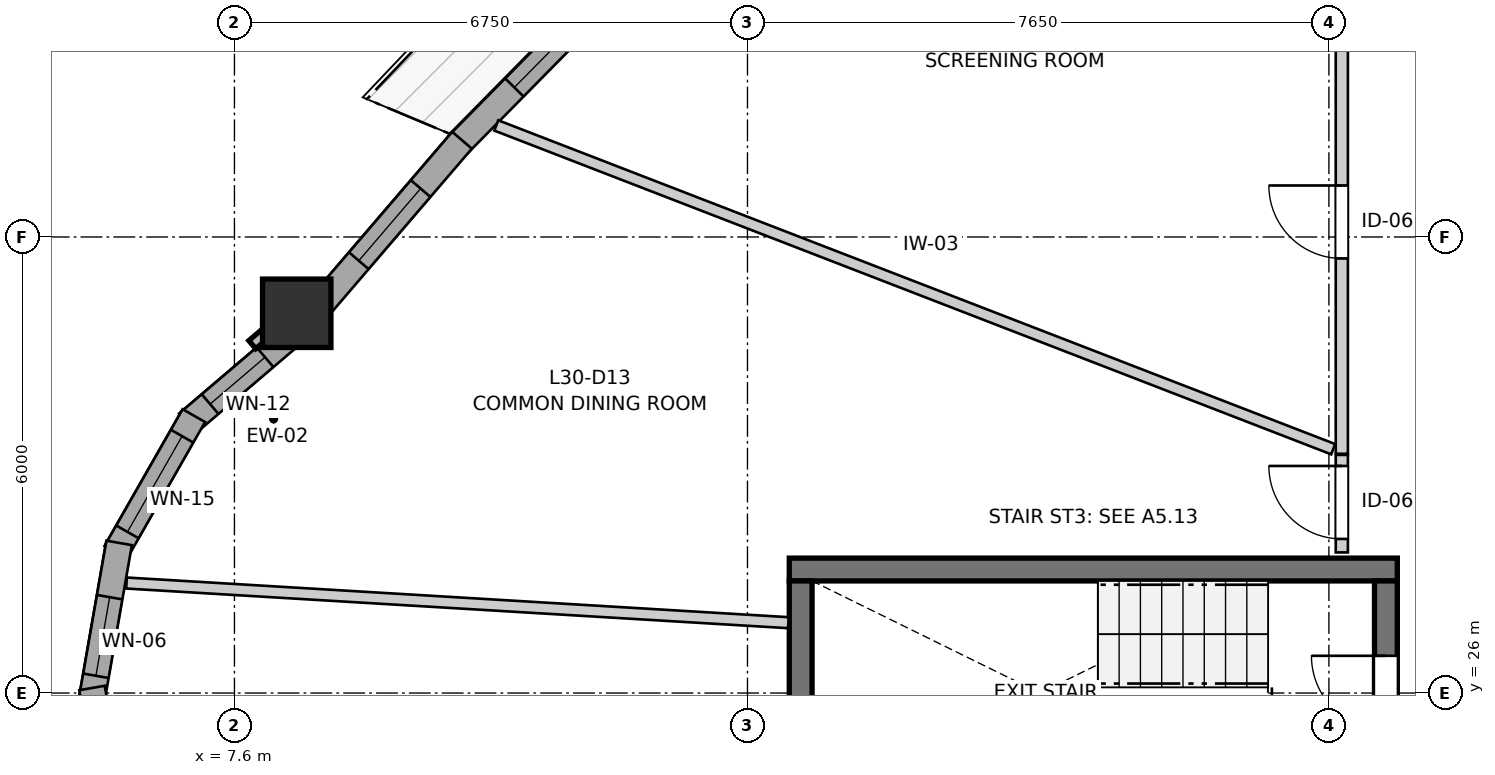
"""IFC4 building model, lengths in metres.
Left out: names, types, materials, properties, quantities, classifications, styles, units other than length and angle.
Written with IfcOpenShell. Run it as: python <this file> out.ifc"""

import sys

from ifc_helpers import new_model, si_unit, direction, frame, frame_2d, origin, origin_2d, place, context, subcontext, project, spatial, rectangle, extrude, source, transform, mapped, element, fill, save


model = new_model("IFC4")
c1 = context("Model", 3, precision=1e-05, world=origin(), true_north=direction((0.0, 1.0)))
c2 = subcontext(c1, "Body", "Model", "MODEL_VIEW")
j1 = project(units=[si_unit("LENGTHUNIT", "METRE"), si_unit("PLANEANGLEUNIT", "RADIAN")], contexts=[c1])
p1 = place(None, origin())
s1 = spatial("IfcSite", under=j1, at=p1, CompositionType="ELEMENT")
p2 = place(p1, origin())
s2 = spatial("IfcBuilding", under=s1, at=p2, CompositionType="ELEMENT")
p3 = place(p2, frame((0.0, 0.0, 102.4)))
s3 = spatial("IfcBuildingStorey", under=s2, at=p3, CompositionType="ELEMENT", Elevation=102.4)
p4 = place(p3, frame((22.9, 27.625, 0.0), z_axis=(0.0, 0.0, 1.0), x_axis=(-1.0, 0.0, 0.0)))
e1 = element("IfcWall", 1, at=p4, inside=s3, PredefinedType="SHEAR", context=c2, shape_type="SweptSolid", body=[
    extrude(rectangle(XDim=8.0, YDim=0.3, at=frame_2d((4.0, 0.0))), origin(), (0.0, 0.0, 1.0), 2.95),
])
p5 = place(p3, frame((15.05, 27.475, 0.0), z_axis=(0.0, 0.0, 1.0), x_axis=(0.0, -1.0, 0.0)))
e2 = element("IfcWall", 2, at=p5, inside=s3, PredefinedType="SHEAR", context=c2, shape_type="SweptSolid", body=[
    extrude(rectangle(XDim=2.95, YDim=0.3, at=frame_2d((1.475, 0.0))), origin(), (0.0, 0.0, 1.0), 2.95),
])
p6 = place(p3, frame((22.75, 24.525, 0.0), z_axis=(0.0, 0.0, 1.0), x_axis=(0.0, 1.0, 0.0)))
e3 = element("IfcWall", 3, at=p6, inside=s3, PredefinedType="SHEAR", context=c2, shape_type="SweptSolid", body=[
    extrude(rectangle(XDim=2.95, YDim=0.3, at=frame_2d((1.475, 0.0))), origin(), (0.0, 0.0, 1.0), 2.95),
])
p7 = place(p6, frame((0.985, 0.0, 0.0)))
e4 = element("IfcOpeningElement", 4, at=p7, cuts=e3, PredefinedType="OPENING", context=c2, shape_type="SweptSolid", body=[
    extrude(rectangle(XDim=0.98, YDim=2.15, at=frame_2d((0.49, 1.075))), frame((0.0, 0.16, 0.0), z_axis=(0.0, -1.0, 0.0), x_axis=(1.0, 0.0, 0.0)), (0.0, 0.0, 1.0), 0.32),
])
m1 = source(origin(), c2, "Body", "SweptSolid", [
    extrude(rectangle(XDim=0.9, YDim=0.9, at=origin_2d()), origin(), (0.0, 0.0, 1.0), 2.95),
])
p8 = place(p3, frame((8.419, 30.996, 0.0), z_axis=(0.0, 0.0, 1.0), x_axis=(1.0, 0.0, 0.0)))
e5 = element("IfcColumn", 5, at=p8, inside=s3, PredefinedType="COLUMN", context=c2, shape_type="MappedRepresentation", body=[
    mapped(m1, transform((0.0, 0.0, 0.0), x_axis=(1.0, 0.0, 0.0), y_axis=(0.0, 1.0, 0.0), z_axis=(0.0, 0.0, 1.0), scale=1.0)),
])
p9 = place(p3, frame((8.355, 30.718, 0.0), z_axis=(0.0, 0.0, 1.0), x_axis=(-0.761134405886, -0.648594184507, 0.0)))
e6 = element("IfcWall", 6, at=p9, inside=s3, PredefinedType="SOLIDWALL", context=c2, shape_type="SweptSolid", body=[
    extrude(rectangle(XDim=1.805, YDim=0.34, at=frame_2d((0.902, 0.0))), origin(), (0.0, 0.0, 1.0), 2.48),
])
p10 = place(p9, frame((0.462, 0.0, 0.82)))
e7 = element("IfcOpeningElement", 7, at=p10, cuts=e6, PredefinedType="OPENING", context=c2, shape_type="SweptSolid", body=[
    extrude(rectangle(XDim=0.95, YDim=1.35, at=frame_2d((0.475, 0.675))), frame((0.0, 0.18, 0.0), z_axis=(0.0, -1.0, 0.0), x_axis=(1.0, 0.0, 0.0)), (0.0, 0.0, 1.0), 0.36),
])
p11 = place(p3, frame((7.066, 29.65, 0.0), z_axis=(0.0, 0.0, 1.0), x_axis=(-0.496037473582, -0.868301114132, 0.0)))
e8 = element("IfcWall", 8, at=p11, inside=s3, PredefinedType="SOLIDWALL", context=c2, shape_type="SweptSolid", body=[
    extrude(rectangle(XDim=2.073, YDim=0.34, at=frame_2d((1.037, 0.0))), origin(), (0.0, 0.0, 1.0), 2.48),
])
p12 = place(p11, frame((0.312, 0.0, 0.82)))
e9 = element("IfcOpeningElement", 9, at=p12, cuts=e8, PredefinedType="OPENING", context=c2, shape_type="SweptSolid", body=[
    extrude(rectangle(XDim=1.45, YDim=1.25, at=frame_2d((0.725, 0.625))), frame((0.0, 0.18, 0.0), z_axis=(0.0, -1.0, 0.0), x_axis=(1.0, 0.0, 0.0)), (0.0, 0.0, 1.0), 0.36),
])
p13 = place(p3, frame((6.083, 27.975, 0.0), z_axis=(0.0, 0.0, 1.0), x_axis=(-0.172186061474, -0.985064444711, 0.0)))
e10 = element("IfcWall", 10, at=p13, inside=s3, PredefinedType="SOLIDWALL", context=c2, shape_type="SweptSolid", body=[
    extrude(rectangle(XDim=2.073, YDim=0.34, at=frame_2d((1.037, 0.0))), origin(), (0.0, 0.0, 1.0), 2.48),
])
p14 = place(p13, frame((0.725, 0.0, 0.82)))
e11 = element("IfcOpeningElement", 11, at=p14, cuts=e10, PredefinedType="OPENING", context=c2, shape_type="SweptSolid", body=[
    extrude(rectangle(XDim=1.05, YDim=1.45, at=frame_2d((0.525, 0.725))), frame((0.0, 0.18, 0.0), z_axis=(0.0, -1.0, 0.0), x_axis=(1.0, 0.0, 0.0)), (0.0, 0.0, 1.0), 0.36),
])
p15 = place(p3, frame((5.726, 26.067, 0.0), z_axis=(0.0, 0.0, 1.0), x_axis=(0.172186061474, -0.985064444711, 0.0)))
e12 = element("IfcWall", 12, at=p15, inside=s3, PredefinedType="SOLIDWALL", context=c2, shape_type="SweptSolid", body=[
    extrude(rectangle(XDim=2.073, YDim=0.34, at=frame_2d((1.037, 0.0))), origin(), (0.0, 0.0, 1.0), 2.48),
])
p16 = place(p15, frame((0.312, 0.0, 0.82)))
e13 = element("IfcOpeningElement", 13, at=p16, cuts=e12, PredefinedType="OPENING", context=c2, shape_type="SweptSolid", body=[
    extrude(rectangle(XDim=1.45, YDim=1.25, at=frame_2d((0.725, 0.625))), frame((0.0, 0.18, 0.0), z_axis=(0.0, -1.0, 0.0), x_axis=(1.0, 0.0, 0.0)), (0.0, 0.0, 1.0), 0.36),
])
p17 = place(p3, frame((12.682, 35.386, 0.0), z_axis=(0.0, 0.0, 1.0), x_axis=(-0.701899134886, -0.712276353985, 0.0)))
e14 = element("IfcWall", 14, at=p17, inside=s3, PredefinedType="SOLIDWALL", context=c2, shape_type="SweptSolid", body=[
    extrude(rectangle(XDim=3.058, YDim=0.34, at=frame_2d((1.529, 0.0))), origin(), (0.0, 0.0, 1.0), 2.48),
])
p18 = place(p17, frame((0.593, 0.0, 0.82)))
e15 = element("IfcOpeningElement", 15, at=p18, cuts=e14, PredefinedType="OPENING", context=c2, shape_type="SweptSolid", body=[
    extrude(rectangle(XDim=1.4, YDim=1.35, at=frame_2d((0.7, 0.675))), frame((0.0, 0.18, 0.0), z_axis=(0.0, -1.0, 0.0), x_axis=(1.0, 0.0, 0.0)), (0.0, 0.0, 1.0), 0.36),
])
p19 = place(p3, frame((10.594, 33.272, 0.0), z_axis=(0.0, 0.0, 1.0), x_axis=(-0.650763769467, -0.759280262057, 0.0)))
e16 = element("IfcWall", 16, at=p19, inside=s3, PredefinedType="SOLIDWALL", context=c2, shape_type="SweptSolid", body=[
    extrude(rectangle(XDim=2.914, YDim=0.34, at=frame_2d((1.457, 0.0))), origin(), (0.0, 0.0, 1.0), 2.48),
])
p20 = place(p19, frame((0.837, 0.0, 0.82)))
e17 = element("IfcOpeningElement", 17, at=p20, cuts=e16, PredefinedType="OPENING", context=c2, shape_type="SweptSolid", body=[
    extrude(rectangle(XDim=1.25, YDim=1.35, at=frame_2d((0.625, 0.675))), frame((0.0, 0.18, 0.0), z_axis=(0.0, -1.0, 0.0), x_axis=(1.0, 0.0, 0.0)), (0.0, 0.0, 1.0), 0.36),
])
p21 = place(p3, frame((22.17, 29.148, 0.0), z_axis=(0.0, 0.0, 1.0), x_axis=(0.0, 1.0, 0.0)))
e18 = element("IfcWall", 18, at=p21, inside=s3, PredefinedType="PARTITIONING", context=c2, shape_type="SweptSolid", body=[
    extrude(rectangle(XDim=6.106, YDim=0.16, at=frame_2d((3.053, 0.0))), origin(), (0.0, 0.0, 1.0), 2.95),
])
p22 = place(p21, frame((2.57, 0.0, 0.0)))
e19 = element("IfcOpeningElement", 19, at=p22, cuts=e18, PredefinedType="OPENING", context=c2, shape_type="SweptSolid", body=[
    extrude(rectangle(XDim=0.96, YDim=2.1, at=frame_2d((0.48, 1.05))), frame((0.0, 0.09, 0.0), z_axis=(0.0, -1.0, 0.0), x_axis=(1.0, 0.0, 0.0)), (0.0, 0.0, 1.0), 0.18),
])
p23 = place(p3, frame((22.17, 27.85, 0.0), z_axis=(0.0, 0.0, 1.0), x_axis=(0.0, 1.0, 0.0)))
e20 = element("IfcWall", 20, at=p23, inside=s3, PredefinedType="PARTITIONING", context=c2, shape_type="SweptSolid", body=[
    extrude(rectangle(XDim=1.283, YDim=0.16, at=frame_2d((0.642, 0.0))), origin(), (0.0, 0.0, 1.0), 2.95),
])
p24 = place(p23, frame((0.177, 0.0, 0.0)))
e21 = element("IfcOpeningElement", 21, at=p24, cuts=e20, PredefinedType="OPENING", context=c2, shape_type="SweptSolid", body=[
    extrude(rectangle(XDim=0.96, YDim=2.1, at=frame_2d((0.48, 1.05))), frame((0.0, 0.09, 0.0), z_axis=(0.0, -1.0, 0.0), x_axis=(1.0, 0.0, 0.0)), (0.0, 0.0, 1.0), 0.18),
])
p25 = place(p3, frame((11.045, 33.468, 0.0), z_axis=(0.0, 0.0, 1.0), x_axis=(0.932653180854, -0.360774228906, 0.0)))
e22 = element("IfcWall", 22, at=p25, inside=s3, PredefinedType="PARTITIONING", context=c2, shape_type="SweptSolid", body=[
    extrude(rectangle(XDim=11.807, YDim=0.145, at=frame_2d((5.903, 0.0))), origin(), (0.0, 0.0, 1.0), 2.95),
])
p26 = place(p3, frame((6.18, 27.448, 0.0), z_axis=(0.0, 0.0, 1.0), x_axis=(0.998209995059, -0.059806402362, 0.0)))
e23 = element("IfcWall", 23, at=p26, inside=s3, PredefinedType="PARTITIONING", context=c2, shape_type="SweptSolid", body=[
    extrude(rectangle(XDim=8.724, YDim=0.145, at=frame_2d((4.362, 0.0))), origin(), (0.0, 0.0, 1.0), 2.95),
])
m2 = source(origin(), c2, "Body", "SweptSolid", [
    extrude(rectangle(XDim=0.95, YDim=1.35, at=frame_2d((0.475, 0.675))), frame((0.0, 0.03, 0.0), z_axis=(0.0, -1.0, 0.0), x_axis=(1.0, 0.0, 0.0)), (0.0, 0.0, 1.0), 0.06),
])
p27 = place(p10, origin())
e24 = element("IfcWindow", 24, at=p27, inside=s3, PartitioningType="SINGLE_PANEL", PredefinedType="WINDOW", context=c2, shape_type="MappedRepresentation", body=[
    mapped(m2, transform((0.0, 0.0, 0.0), x_axis=(1.0, 0.0, 0.0), y_axis=(0.0, 1.0, 0.0), z_axis=(0.0, 0.0, 1.0), scale=1.0)),
])
fill(e7, e24)
m3 = source(origin(), c2, "Body", "SweptSolid", [
    extrude(rectangle(XDim=1.45, YDim=1.25, at=frame_2d((0.725, 0.625))), frame((0.0, 0.03, 0.0), z_axis=(0.0, -1.0, 0.0), x_axis=(1.0, 0.0, 0.0)), (0.0, 0.0, 1.0), 0.06),
])
p28 = place(p12, origin())
e25 = element("IfcWindow", 25, at=p28, inside=s3, PartitioningType="SINGLE_PANEL", PredefinedType="WINDOW", context=c2, shape_type="MappedRepresentation", body=[
    mapped(m3, transform((0.0, 0.0, 0.0), x_axis=(1.0, 0.0, 0.0), y_axis=(0.0, 1.0, 0.0), z_axis=(0.0, 0.0, 1.0), scale=1.0)),
])
fill(e9, e25)
m4 = source(origin(), c2, "Body", "SweptSolid", [
    extrude(rectangle(XDim=1.05, YDim=1.45, at=frame_2d((0.525, 0.725))), frame((0.0, 0.03, 0.0), z_axis=(0.0, -1.0, 0.0), x_axis=(1.0, 0.0, 0.0)), (0.0, 0.0, 1.0), 0.06),
])
p29 = place(p14, origin())
e26 = element("IfcWindow", 26, at=p29, inside=s3, PartitioningType="SINGLE_PANEL", PredefinedType="WINDOW", context=c2, shape_type="MappedRepresentation", body=[
    mapped(m4, transform((0.0, 0.0, 0.0), x_axis=(1.0, 0.0, 0.0), y_axis=(0.0, 1.0, 0.0), z_axis=(0.0, 0.0, 1.0), scale=1.0)),
])
fill(e11, e26)
m5 = source(origin(), c2, "Body", "SweptSolid", [
    extrude(rectangle(XDim=1.4, YDim=1.35, at=frame_2d((0.7, 0.675))), frame((0.0, 0.03, 0.0), z_axis=(0.0, -1.0, 0.0), x_axis=(1.0, 0.0, 0.0)), (0.0, 0.0, 1.0), 0.06),
])
p30 = place(p18, origin())
e27 = element("IfcWindow", 27, at=p30, inside=s3, PartitioningType="SINGLE_PANEL", PredefinedType="WINDOW", context=c2, shape_type="MappedRepresentation", body=[
    mapped(m5, transform((0.0, 0.0, 0.0), x_axis=(1.0, 0.0, 0.0), y_axis=(0.0, 1.0, 0.0), z_axis=(0.0, 0.0, 1.0), scale=1.0)),
])
fill(e15, e27)
m6 = source(origin(), c2, "Body", "SweptSolid", [
    extrude(rectangle(XDim=1.25, YDim=1.35, at=frame_2d((0.625, 0.675))), frame((0.0, 0.03, 0.0), z_axis=(0.0, -1.0, 0.0), x_axis=(1.0, 0.0, 0.0)), (0.0, 0.0, 1.0), 0.06),
])
p31 = place(p20, origin())
e28 = element("IfcWindow", 28, at=p31, inside=s3, PartitioningType="SINGLE_PANEL", PredefinedType="WINDOW", context=c2, shape_type="MappedRepresentation", body=[
    mapped(m6, transform((0.0, 0.0, 0.0), x_axis=(1.0, 0.0, 0.0), y_axis=(0.0, 1.0, 0.0), z_axis=(0.0, 0.0, 1.0), scale=1.0)),
])
fill(e17, e28)
m7 = source(origin(), c2, "Body", "SweptSolid", [
    extrude(rectangle(XDim=0.98, YDim=2.15, at=frame_2d((0.49, 1.075))), frame((0.0, 0.025, 0.0), z_axis=(0.0, -1.0, 0.0), x_axis=(1.0, 0.0, 0.0)), (0.0, 0.0, 1.0), 0.05),
])
p32 = place(p7, origin())
e29 = element("IfcDoor", 29, at=p32, inside=s3, OperationType="SINGLE_SWING_RIGHT", PredefinedType="DOOR", context=c2, shape_type="MappedRepresentation", body=[
    mapped(m7, transform((0.0, 0.0, 0.0), x_axis=(1.0, 0.0, 0.0), y_axis=(0.0, 1.0, 0.0), z_axis=(0.0, 0.0, 1.0), scale=1.0)),
])
fill(e4, e29)
m8 = source(origin(), c2, "Body", "SweptSolid", [
    extrude(rectangle(XDim=0.96, YDim=2.1, at=frame_2d((0.48, 1.05))), frame((0.0, 0.025, 0.0), z_axis=(0.0, -1.0, 0.0), x_axis=(1.0, 0.0, 0.0)), (0.0, 0.0, 1.0), 0.05),
])
p33 = place(p22, origin())
e30 = element("IfcDoor", 30, at=p33, inside=s3, OperationType="SINGLE_SWING_RIGHT", PredefinedType="DOOR", context=c2, shape_type="MappedRepresentation", body=[
    mapped(m8, transform((0.0, 0.0, 0.0), x_axis=(1.0, 0.0, 0.0), y_axis=(0.0, 1.0, 0.0), z_axis=(0.0, 0.0, 1.0), scale=1.0)),
])
fill(e19, e30)
p34 = place(p24, origin())
e31 = element("IfcDoor", 31, at=p34, inside=s3, OperationType="SINGLE_SWING_RIGHT", PredefinedType="DOOR", context=c2, shape_type="MappedRepresentation", body=[
    mapped(m8, transform((0.0, 0.0, 0.0), x_axis=(1.0, 0.0, 0.0), y_axis=(0.0, 1.0, 0.0), z_axis=(0.0, 0.0, 1.0), scale=1.0)),
])
fill(e21, e31)
save(model, sys.argv[1])
